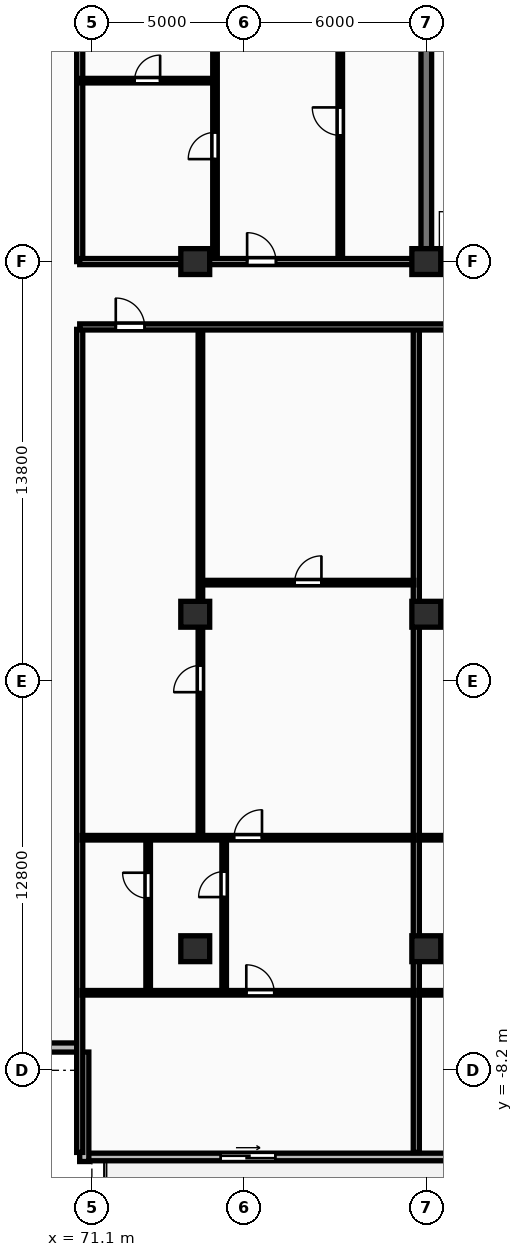
"""IFC4 building model, lengths in metres.
Left out: names, types, materials, properties, quantities, classifications, styles, units other than length and angle.
Written with IfcOpenShell. Run it as: python <this file> out.ifc"""

import sys

from ifc_helpers import new_model, si_unit, direction, frame, frame_2d, origin, origin_2d, place, context, subcontext, project, spatial, rectangle, extrude, element, fill, save


model = new_model("IFC4")
c1 = context("Model", 3, precision=1e-05, world=origin(), true_north=direction((0.0, 1.0)))
c2 = subcontext(c1, "Body", "Model", "MODEL_VIEW")
j1 = project(units=[si_unit("LENGTHUNIT", "METRE"), si_unit("PLANEANGLEUNIT", "RADIAN")], contexts=[c1])
p1 = place(None, origin())
s1 = spatial("IfcSite", under=j1, at=p1, CompositionType="ELEMENT")
p2 = place(p1, origin())
s2 = spatial("IfcBuilding", under=s1, at=p2, CompositionType="ELEMENT")
p3 = place(p2, frame((0.0, 0.0, 24.0)))
s3 = spatial("IfcBuildingStorey", under=s2, at=p3, CompositionType="ELEMENT", Elevation=24.0)
for number, where, z_axis, x_axis in (
    (1, (74.5, -4.2, 0.0), (0.0, 0.0, 1.0), (1.0, 0.0, 0.0)),
    (2, (74.5, 6.8, 0.0), (0.0, 0.0, 1.0), (1.0, 0.0, 0.0)),
    (3, (74.5, 18.4, 0.0), (0.0, 0.0, 1.0), (1.0, 0.0, 0.0)),
    (4, (82.1, -4.2, 0.0), (0.0, 0.0, 1.0), (1.0, 0.0, 0.0)),
    (5, (82.1, 6.8, 0.0), (0.0, 0.0, 1.0), (1.0, 0.0, 0.0)),
    (6, (82.1, 18.4, 0.0), (0.0, 0.0, 1.0), (1.0, 0.0, 0.0)),
):
    element("IfcColumn", number, at=place(p3, frame(where, z_axis=z_axis, x_axis=x_axis)), inside=s3, PredefinedType="COLUMN", context=c2, shape_type="SweptSolid", body=[
        extrude(rectangle(XDim=0.95, YDim=0.85, at=origin_2d()), origin(), (0.0, 0.0, 1.0), 3.25),
    ])
p4 = place(p3, frame((70.7, -11.05, 0.0), z_axis=(0.0, 0.0, 1.0), x_axis=(1.0, 0.0, 0.0)))
e7 = element("IfcWall", 7, at=p4, inside=s3, PredefinedType="STANDARD", context=c2, shape_type="SweptSolid", body=[
    extrude(rectangle(XDim=62.0, YDim=0.25, at=frame_2d((31.0, 0.0))), origin(), (0.0, 0.0, 1.0), 2.97),
])
p5 = place(p4, frame((4.636, 0.0, 0.0)))
e8 = element("IfcOpeningElement", 8, at=p5, cuts=e7, PredefinedType="OPENING", context=c2, shape_type="SweptSolid", body=[
    extrude(rectangle(XDim=1.8, YDim=2.2, at=frame_2d((0.9, 1.1))), frame((0.0, 0.135, 0.0), z_axis=(0.0, -1.0, 0.0), x_axis=(1.0, 0.0, 0.0)), (0.0, 0.0, 1.0), 0.27),
])
p6 = place(p4, frame((16.261, 0.0, 0.0)))
e9 = element("IfcOpeningElement", 9, at=p6, cuts=e7, PredefinedType="OPENING", context=c2, shape_type="SweptSolid", body=[
    extrude(rectangle(XDim=1.8, YDim=2.2, at=frame_2d((0.9, 1.1))), frame((0.0, 0.135, 0.0), z_axis=(0.0, -1.0, 0.0), x_axis=(1.0, 0.0, 0.0)), (0.0, 0.0, 1.0), 0.27),
])
p7 = place(p4, frame((27.886, 0.0, 0.0)))
e10 = element("IfcOpeningElement", 10, at=p7, cuts=e7, PredefinedType="OPENING", context=c2, shape_type="SweptSolid", body=[
    extrude(rectangle(XDim=1.8, YDim=2.2, at=frame_2d((0.9, 1.1))), frame((0.0, 0.135, 0.0), z_axis=(0.0, -1.0, 0.0), x_axis=(1.0, 0.0, 0.0)), (0.0, 0.0, 1.0), 0.27),
])
p8 = place(p4, frame((40.064, 0.0, 0.0)))
e11 = element("IfcOpeningElement", 11, at=p8, cuts=e7, PredefinedType="OPENING", context=c2, shape_type="SweptSolid", body=[
    extrude(rectangle(XDim=1.8, YDim=2.2, at=frame_2d((0.9, 1.1))), frame((0.0, 0.135, 0.0), z_axis=(0.0, -1.0, 0.0), x_axis=(1.0, 0.0, 0.0)), (0.0, 0.0, 1.0), 0.27),
])
p9 = place(p4, frame((51.124, 0.0, 0.0)))
e12 = element("IfcOpeningElement", 12, at=p9, cuts=e7, PredefinedType="OPENING", context=c2, shape_type="SweptSolid", body=[
    extrude(rectangle(XDim=1.8, YDim=2.2, at=frame_2d((0.9, 1.1))), frame((0.0, 0.135, 0.0), z_axis=(0.0, -1.0, 0.0), x_axis=(1.0, 0.0, 0.0)), (0.0, 0.0, 1.0), 0.27),
])
p10 = place(p4, frame((57.9, 0.0, 0.85)))
e13 = element("IfcOpeningElement", 13, at=p10, cuts=e7, PredefinedType="OPENING", context=c2, shape_type="SweptSolid", body=[
    extrude(rectangle(XDim=2.4, YDim=1.9, at=frame_2d((1.2, 0.95))), frame((0.0, 0.135, 0.0), z_axis=(0.0, -1.0, 0.0), x_axis=(1.0, 0.0, 0.0)), (0.0, 0.0, 1.0), 0.27),
])
for number, where, z_axis, x_axis in (
    (14, (67.1, -7.45, 0.0), (0.0, 0.0, 1.0), (1.0, 0.0, 0.0)),
    (15, (70.85, -7.6, 0.0), (0.0, 0.0, 1.0), (0.0, -1.0, 0.0)),
):
    element("IfcWall", number, at=place(p3, frame(where, z_axis=z_axis, x_axis=x_axis)), inside=s3, PredefinedType="STANDARD", context=c2, shape_type="SweptSolid", body=[
        extrude(rectangle(XDim=3.6, YDim=0.3, at=frame_2d((1.8, 0.0))), origin(), (0.0, 0.0, 1.0), 2.97),
    ])
p11 = place(p3, frame((82.1, 18.575, 0.0), z_axis=(0.0, 0.0, 1.0), x_axis=(0.0, 1.0, 0.0)))
e16 = element("IfcWall", 16, at=p11, inside=s3, PredefinedType="SHEAR", context=c2, shape_type="SweptSolid", body=[
    extrude(rectangle(XDim=11.65, YDim=0.35, at=frame_2d((5.825, 0.0))), origin(), (0.0, 0.0, 1.0), 3.25),
])
p12 = place(p3, frame((81.925, 18.4, 0.0), z_axis=(0.0, 0.0, 1.0), x_axis=(1.0, 0.0, 0.0)))
e17 = element("IfcWall", 17, at=p12, inside=s3, PredefinedType="SHEAR", context=c2, shape_type="SweptSolid", body=[
    extrude(rectangle(XDim=36.265, YDim=0.35, at=frame_2d((18.132, 0.0))), origin(), (0.0, 0.0, 1.0), 3.25),
])
p13 = place(p12, frame((5.675, 0.0, 0.0)))
e18 = element("IfcOpeningElement", 18, at=p13, cuts=e17, PredefinedType="OPENING", context=c2, shape_type="SweptSolid", body=[
    extrude(rectangle(XDim=1.0, YDim=2.15, at=frame_2d((0.5, 1.075))), frame((0.0, 0.185, 0.0), z_axis=(0.0, -1.0, 0.0), x_axis=(1.0, 0.0, 0.0)), (0.0, 0.0, 1.0), 0.37),
])
p14 = place(p12, frame((21.925, 0.0, 0.0)))
e19 = element("IfcOpeningElement", 19, at=p14, cuts=e17, PredefinedType="OPENING", context=c2, shape_type="SweptSolid", body=[
    extrude(rectangle(XDim=1.5, YDim=2.2, at=frame_2d((0.75, 1.1))), frame((0.0, 0.185, 0.0), z_axis=(0.0, -1.0, 0.0), x_axis=(1.0, 0.0, 0.0)), (0.0, 0.0, 1.0), 0.37),
])
p15 = place(p12, frame((29.875, 0.0, 0.0)))
e20 = element("IfcOpeningElement", 20, at=p15, cuts=e17, PredefinedType="OPENING", context=c2, shape_type="SweptSolid", body=[
    extrude(rectangle(XDim=1.0, YDim=2.15, at=frame_2d((0.5, 1.075))), frame((0.0, 0.185, 0.0), z_axis=(0.0, -1.0, 0.0), x_axis=(1.0, 0.0, 0.0)), (0.0, 0.0, 1.0), 0.37),
])
p16 = place(p3, frame((70.7, 18.4, 0.0), z_axis=(0.0, 0.0, 1.0), x_axis=(0.0, 1.0, 0.0)))
e21 = element("IfcWall", 21, at=p16, inside=s3, PredefinedType="PARTITIONING", context=c2, shape_type="SweptSolid", body=[
    extrude(rectangle(XDim=14.1, YDim=0.2, at=frame_2d((7.05, 0.0))), origin(), (0.0, 0.0, 1.0), 2.97),
])
p17 = place(p3, frame((70.7, 24.35, 0.0), z_axis=(0.0, 0.0, 1.0), x_axis=(1.0, 0.0, 0.0)))
e22 = element("IfcWall", 22, at=p17, inside=s3, PredefinedType="PARTITIONING", context=c2, shape_type="SweptSolid", body=[
    extrude(rectangle(XDim=4.45, YDim=0.15, at=frame_2d((2.225, 0.0))), origin(), (0.0, 0.0, 1.0), 2.97),
])
p18 = place(p17, frame((1.805, 0.0, 0.0)))
e23 = element("IfcOpeningElement", 23, at=p18, cuts=e22, PredefinedType="OPENING", context=c2, shape_type="SweptSolid", body=[
    extrude(rectangle(XDim=0.84, YDim=2.04, at=frame_2d((0.42, 1.02))), frame((0.0, 0.085, 0.0), z_axis=(0.0, -1.0, 0.0), x_axis=(1.0, 0.0, 0.0)), (0.0, 0.0, 1.0), 0.17),
])
p19 = place(p3, frame((75.15, 18.45, 0.0), z_axis=(0.0, 0.0, 1.0), x_axis=(0.0, 1.0, 0.0)))
e24 = element("IfcWall", 24, at=p19, inside=s3, PredefinedType="PARTITIONING", context=c2, shape_type="SweptSolid", body=[
    extrude(rectangle(XDim=14.05, YDim=0.15, at=frame_2d((7.025, 0.0))), origin(), (0.0, 0.0, 1.0), 2.97),
])
p20 = place(p19, frame((3.32, 0.0, 0.0)))
e25 = element("IfcOpeningElement", 25, at=p20, cuts=e24, PredefinedType="OPENING", context=c2, shape_type="SweptSolid", body=[
    extrude(rectangle(XDim=0.88, YDim=2.06, at=frame_2d((0.44, 1.03))), frame((0.0, 0.085, 0.0), z_axis=(0.0, -1.0, 0.0), x_axis=(1.0, 0.0, 0.0)), (0.0, 0.0, 1.0), 0.17),
])
p21 = place(p3, frame((79.27, 18.45, 0.0), z_axis=(0.0, 0.0, 1.0), x_axis=(0.0, 1.0, 0.0)))
e26 = element("IfcWall", 26, at=p21, inside=s3, PredefinedType="PARTITIONING", context=c2, shape_type="SweptSolid", body=[
    extrude(rectangle(XDim=9.12, YDim=0.15, at=frame_2d((4.56, 0.0))), origin(), (0.0, 0.0, 1.0), 2.97),
])
p22 = place(p21, frame((4.1, 0.0, 0.0)))
e27 = element("IfcOpeningElement", 27, at=p22, cuts=e26, PredefinedType="OPENING", context=c2, shape_type="SweptSolid", body=[
    extrude(rectangle(XDim=0.92, YDim=2.08, at=frame_2d((0.46, 1.04))), frame((0.0, 0.085, 0.0), z_axis=(0.0, -1.0, 0.0), x_axis=(1.0, 0.0, 0.0)), (0.0, 0.0, 1.0), 0.17),
])
p23 = place(p3, frame((70.7, 18.4, 0.0), z_axis=(0.0, 0.0, 1.0), x_axis=(1.0, 0.0, 0.0)))
e28 = element("IfcWall", 28, at=p23, inside=s3, PredefinedType="PARTITIONING", context=c2, shape_type="SweptSolid", body=[
    extrude(rectangle(XDim=11.25, YDim=0.2, at=frame_2d((5.625, 0.0))), origin(), (0.0, 0.0, 1.0), 2.37),
])
p24 = place(p23, frame((5.506, 0.0, 0.0)))
e29 = element("IfcOpeningElement", 29, at=p24, cuts=e28, PredefinedType="OPENING", context=c2, shape_type="SweptSolid", body=[
    extrude(rectangle(XDim=0.95, YDim=2.15, at=frame_2d((0.475, 1.075))), frame((0.0, 0.11, 0.0), z_axis=(0.0, -1.0, 0.0), x_axis=(1.0, 0.0, 0.0)), (0.0, 0.0, 1.0), 0.22),
])
p25 = place(p3, frame((70.7, -10.9, 0.0), z_axis=(0.0, 0.0, 1.0), x_axis=(0.0, 1.0, 0.0)))
e30 = element("IfcWall", 30, at=p25, inside=s3, PredefinedType="PARTITIONING", context=c2, shape_type="SweptSolid", body=[
    extrude(rectangle(XDim=27.07, YDim=0.2, at=frame_2d((13.535, 0.0))), origin(), (0.0, 0.0, 1.0), 2.97),
])
p26 = place(p3, frame((81.771, -10.9, 0.0), z_axis=(0.0, 0.0, 1.0), x_axis=(0.0, 1.0, 0.0)))
e31 = element("IfcWall", 31, at=p26, inside=s3, PredefinedType="PARTITIONING", context=c2, shape_type="SweptSolid", body=[
    extrude(rectangle(XDim=27.07, YDim=0.2, at=frame_2d((13.535, 0.0))), origin(), (0.0, 0.0, 1.0), 2.22),
])
p27 = place(p3, frame((74.73, 7.84, 0.0), z_axis=(0.0, 0.0, 1.0), x_axis=(1.0, 0.0, 0.0)))
e32 = element("IfcWall", 32, at=p27, inside=s3, PredefinedType="PARTITIONING", context=c2, shape_type="SweptSolid", body=[
    extrude(rectangle(XDim=6.961, YDim=0.15, at=frame_2d((3.481, 0.0))), origin(), (0.0, 0.0, 1.0), 2.97),
])
p28 = place(p27, frame((3.041, 0.0, 0.0)))
e33 = element("IfcOpeningElement", 33, at=p28, cuts=e32, PredefinedType="OPENING", context=c2, shape_type="SweptSolid", body=[
    extrude(rectangle(XDim=0.88, YDim=2.06, at=frame_2d((0.44, 1.03))), frame((0.0, 0.085, 0.0), z_axis=(0.0, -1.0, 0.0), x_axis=(1.0, 0.0, 0.0)), (0.0, 0.0, 1.0), 0.17),
])
p29 = place(p3, frame((74.67, -0.51, 0.0), z_axis=(0.0, 0.0, 1.0), x_axis=(0.0, 1.0, 0.0)))
e34 = element("IfcWall", 34, at=p29, inside=s3, PredefinedType="PARTITIONING", context=c2, shape_type="SweptSolid", body=[
    extrude(rectangle(XDim=16.7, YDim=0.15, at=frame_2d((8.35, 0.0))), origin(), (0.0, 0.0, 1.0), 2.22),
])
p30 = place(p29, frame((4.747, 0.0, 0.0)))
e35 = element("IfcOpeningElement", 35, at=p30, cuts=e34, PredefinedType="OPENING", context=c2, shape_type="SweptSolid", body=[
    extrude(rectangle(XDim=0.88, YDim=2.06, at=frame_2d((0.44, 1.03))), frame((0.0, 0.085, 0.0), z_axis=(0.0, -1.0, 0.0), x_axis=(1.0, 0.0, 0.0)), (0.0, 0.0, 1.0), 0.17),
])
p31 = place(p3, frame((72.951, -5.59, 0.0), z_axis=(0.0, 0.0, 1.0), x_axis=(0.0, 1.0, 0.0)))
e36 = element("IfcWall", 36, at=p31, inside=s3, PredefinedType="PARTITIONING", context=c2, shape_type="SweptSolid", body=[
    extrude(rectangle(XDim=5.0, YDim=0.15, at=frame_2d((2.5, 0.0))), origin(), (0.0, 0.0, 1.0), 2.97),
])
p32 = place(p31, frame((3.049, 0.0, 0.0)))
e37 = element("IfcOpeningElement", 37, at=p32, cuts=e36, PredefinedType="OPENING", context=c2, shape_type="SweptSolid", body=[
    extrude(rectangle(XDim=0.84, YDim=2.04, at=frame_2d((0.42, 1.02))), frame((0.0, 0.085, 0.0), z_axis=(0.0, -1.0, 0.0), x_axis=(1.0, 0.0, 0.0)), (0.0, 0.0, 1.0), 0.17),
])
p33 = place(p3, frame((75.451, -5.59, 0.0), z_axis=(0.0, 0.0, 1.0), x_axis=(0.0, 1.0, 0.0)))
e38 = element("IfcWall", 38, at=p33, inside=s3, PredefinedType="PARTITIONING", context=c2, shape_type="SweptSolid", body=[
    extrude(rectangle(XDim=5.0, YDim=0.15, at=frame_2d((2.5, 0.0))), origin(), (0.0, 0.0, 1.0), 2.97),
])
p34 = place(p33, frame((3.088, 0.0, 0.0)))
e39 = element("IfcOpeningElement", 39, at=p34, cuts=e38, PredefinedType="OPENING", context=c2, shape_type="SweptSolid", body=[
    extrude(rectangle(XDim=0.84, YDim=2.04, at=frame_2d((0.42, 1.02))), frame((0.0, 0.085, 0.0), z_axis=(0.0, -1.0, 0.0), x_axis=(1.0, 0.0, 0.0)), (0.0, 0.0, 1.0), 0.17),
])
p35 = place(p3, frame((70.78, -0.55, 0.0), z_axis=(0.0, 0.0, 1.0), x_axis=(1.0, 0.0, 0.0)))
e40 = element("IfcWall", 40, at=p35, inside=s3, PredefinedType="PARTITIONING", context=c2, shape_type="SweptSolid", body=[
    extrude(rectangle(XDim=10.911, YDim=0.15, at=frame_2d((5.456, 0.0))), origin(), (0.0, 0.0, 1.0), 2.97),
])
p36 = place(p35, frame((4.996, 0.0, 0.0)))
e41 = element("IfcOpeningElement", 41, at=p36, cuts=e40, PredefinedType="OPENING", context=c2, shape_type="SweptSolid", body=[
    extrude(rectangle(XDim=0.92, YDim=2.08, at=frame_2d((0.46, 1.04))), frame((0.0, 0.085, 0.0), z_axis=(0.0, -1.0, 0.0), x_axis=(1.0, 0.0, 0.0)), (0.0, 0.0, 1.0), 0.17),
])
p37 = place(p3, frame((70.78, -5.65, 0.0), z_axis=(0.0, 0.0, 1.0), x_axis=(1.0, 0.0, 0.0)))
e42 = element("IfcWall", 42, at=p37, inside=s3, PredefinedType="PARTITIONING", context=c2, shape_type="SweptSolid", body=[
    extrude(rectangle(XDim=10.911, YDim=0.15, at=frame_2d((5.456, 0.0))), origin(), (0.0, 0.0, 1.0), 2.97),
])
p38 = place(p37, frame((5.399, 0.0, 0.0)))
e43 = element("IfcOpeningElement", 43, at=p38, cuts=e42, PredefinedType="OPENING", context=c2, shape_type="SweptSolid", body=[
    extrude(rectangle(XDim=0.92, YDim=2.08, at=frame_2d((0.46, 1.04))), frame((0.0, 0.085, 0.0), z_axis=(0.0, -1.0, 0.0), x_axis=(1.0, 0.0, 0.0)), (0.0, 0.0, 1.0), 0.17),
])
p39 = place(p3, frame((81.851, -0.55, 0.0), z_axis=(0.0, 0.0, 1.0), x_axis=(1.0, 0.0, 0.0)))
e44 = element("IfcWall", 44, at=p39, inside=s3, PredefinedType="PARTITIONING", context=c2, shape_type="SweptSolid", body=[
    extrude(rectangle(XDim=12.019, YDim=0.15, at=frame_2d((6.009, 0.0))), origin(), (0.0, 0.0, 1.0), 2.97),
])
p40 = place(p39, frame((5.999, 0.0, 0.0)))
e45 = element("IfcOpeningElement", 45, at=p40, cuts=e44, PredefinedType="OPENING", context=c2, shape_type="SweptSolid", body=[
    extrude(rectangle(XDim=0.92, YDim=2.08, at=frame_2d((0.46, 1.04))), frame((0.0, 0.085, 0.0), z_axis=(0.0, -1.0, 0.0), x_axis=(1.0, 0.0, 0.0)), (0.0, 0.0, 1.0), 0.17),
])
p41 = place(p3, frame((81.851, -5.65, 0.0), z_axis=(0.0, 0.0, 1.0), x_axis=(1.0, 0.0, 0.0)))
e46 = element("IfcWall", 46, at=p41, inside=s3, PredefinedType="PARTITIONING", context=c2, shape_type="SweptSolid", body=[
    extrude(rectangle(XDim=12.019, YDim=0.15, at=frame_2d((6.009, 0.0))), origin(), (0.0, 0.0, 1.0), 2.97),
])
p42 = place(p41, frame((6.029, 0.0, 0.0)))
e47 = element("IfcOpeningElement", 47, at=p42, cuts=e46, PredefinedType="OPENING", context=c2, shape_type="SweptSolid", body=[
    extrude(rectangle(XDim=0.92, YDim=2.08, at=frame_2d((0.46, 1.04))), frame((0.0, 0.085, 0.0), z_axis=(0.0, -1.0, 0.0), x_axis=(1.0, 0.0, 0.0)), (0.0, 0.0, 1.0), 0.17),
])
p43 = place(p3, frame((70.7, 16.25, 0.0), z_axis=(0.0, 0.0, 1.0), x_axis=(1.0, 0.0, 0.0)))
e48 = element("IfcWall", 48, at=p43, inside=s3, PredefinedType="PARTITIONING", context=c2, shape_type="SweptSolid", body=[
    extrude(rectangle(XDim=62.0, YDim=0.2, at=frame_2d((31.0, 0.0))), origin(), (0.0, 0.0, 1.0), 2.97),
])
p44 = place(p43, frame((1.186, 0.0, 0.0)))
e49 = element("IfcOpeningElement", 49, at=p44, cuts=e48, PredefinedType="OPENING", context=c2, shape_type="SweptSolid", body=[
    extrude(rectangle(XDim=0.95, YDim=2.15, at=frame_2d((0.475, 1.075))), frame((0.0, 0.11, 0.0), z_axis=(0.0, -1.0, 0.0), x_axis=(1.0, 0.0, 0.0)), (0.0, 0.0, 1.0), 0.22),
])
p45 = place(p43, frame((13.116, 0.0, 0.0)))
e50 = element("IfcOpeningElement", 50, at=p45, cuts=e48, PredefinedType="OPENING", context=c2, shape_type="SweptSolid", body=[
    extrude(rectangle(XDim=0.95, YDim=2.15, at=frame_2d((0.475, 1.075))), frame((0.0, 0.11, 0.0), z_axis=(0.0, -1.0, 0.0), x_axis=(1.0, 0.0, 0.0)), (0.0, 0.0, 1.0), 0.22),
])
p46 = place(p43, frame((25.295, 0.0, 0.0)))
e51 = element("IfcOpeningElement", 51, at=p46, cuts=e48, PredefinedType="OPENING", context=c2, shape_type="SweptSolid", body=[
    extrude(rectangle(XDim=0.95, YDim=2.15, at=frame_2d((0.475, 1.075))), frame((0.0, 0.11, 0.0), z_axis=(0.0, -1.0, 0.0), x_axis=(1.0, 0.0, 0.0)), (0.0, 0.0, 1.0), 0.22),
])
p47 = place(p43, frame((35.747, 0.0, 0.0)))
e52 = element("IfcOpeningElement", 52, at=p47, cuts=e48, PredefinedType="OPENING", context=c2, shape_type="SweptSolid", body=[
    extrude(rectangle(XDim=0.95, YDim=2.15, at=frame_2d((0.475, 1.075))), frame((0.0, 0.11, 0.0), z_axis=(0.0, -1.0, 0.0), x_axis=(1.0, 0.0, 0.0)), (0.0, 0.0, 1.0), 0.22),
])
p48 = place(p43, frame((49.652, 0.0, 0.0)))
e53 = element("IfcOpeningElement", 53, at=p48, cuts=e48, PredefinedType="OPENING", context=c2, shape_type="SweptSolid", body=[
    extrude(rectangle(XDim=0.95, YDim=2.15, at=frame_2d((0.475, 1.075))), frame((0.0, 0.11, 0.0), z_axis=(0.0, -1.0, 0.0), x_axis=(1.0, 0.0, 0.0)), (0.0, 0.0, 1.0), 0.22),
])
p49 = place(p5, origin())
e54 = element("IfcDoor", 54, at=p49, inside=s3, OperationType="SLIDING_TO_RIGHT", PredefinedType="DOOR", context=c2, shape_type="SweptSolid", body=[
    extrude(rectangle(XDim=1.8, YDim=2.2, at=frame_2d((0.9, 1.1))), frame((0.0, 0.025, 0.0), z_axis=(0.0, -1.0, 0.0), x_axis=(1.0, 0.0, 0.0)), (0.0, 0.0, 1.0), 0.05),
])
fill(e8, e54)
p50 = place(p18, origin())
e55 = element("IfcDoor", 55, at=p50, inside=s3, OperationType="SINGLE_SWING_RIGHT", PredefinedType="DOOR", context=c2, shape_type="SweptSolid", body=[
    extrude(rectangle(XDim=0.84, YDim=2.04, at=frame_2d((0.42, 1.02))), frame((0.0, 0.025, 0.0), z_axis=(0.0, -1.0, 0.0), x_axis=(1.0, 0.0, 0.0)), (0.0, 0.0, 1.0), 0.05),
])
fill(e23, e55)
p51 = place(p20, origin())
e56 = element("IfcDoor", 56, at=p51, inside=s3, OperationType="SINGLE_SWING_LEFT", PredefinedType="DOOR", context=c2, shape_type="SweptSolid", body=[
    extrude(rectangle(XDim=0.88, YDim=2.06, at=frame_2d((0.44, 1.03))), frame((0.0, 0.025, 0.0), z_axis=(0.0, -1.0, 0.0), x_axis=(1.0, 0.0, 0.0)), (0.0, 0.0, 1.0), 0.05),
])
fill(e25, e56)
p52 = place(p22, origin())
e57 = element("IfcDoor", 57, at=p52, inside=s3, OperationType="SINGLE_SWING_RIGHT", PredefinedType="DOOR", context=c2, shape_type="SweptSolid", body=[
    extrude(rectangle(XDim=0.92, YDim=2.08, at=frame_2d((0.46, 1.04))), frame((0.0, 0.025, 0.0), z_axis=(0.0, -1.0, 0.0), x_axis=(1.0, 0.0, 0.0)), (0.0, 0.0, 1.0), 0.05),
])
fill(e27, e57)
p53 = place(p24, origin())
e58 = element("IfcDoor", 58, at=p53, inside=s3, OperationType="SINGLE_SWING_LEFT", PredefinedType="DOOR", context=c2, shape_type="SweptSolid", body=[
    extrude(rectangle(XDim=0.95, YDim=2.15, at=frame_2d((0.475, 1.075))), frame((0.0, 0.025, 0.0), z_axis=(0.0, -1.0, 0.0), x_axis=(1.0, 0.0, 0.0)), (0.0, 0.0, 1.0), 0.05),
])
fill(e29, e58)
p54 = place(p28, origin())
e59 = element("IfcDoor", 59, at=p54, inside=s3, OperationType="SINGLE_SWING_RIGHT", PredefinedType="DOOR", context=c2, shape_type="SweptSolid", body=[
    extrude(rectangle(XDim=0.88, YDim=2.06, at=frame_2d((0.44, 1.03))), frame((0.0, 0.025, 0.0), z_axis=(0.0, -1.0, 0.0), x_axis=(1.0, 0.0, 0.0)), (0.0, 0.0, 1.0), 0.05),
])
fill(e33, e59)
p55 = place(p30, origin())
e60 = element("IfcDoor", 60, at=p55, inside=s3, OperationType="SINGLE_SWING_LEFT", PredefinedType="DOOR", context=c2, shape_type="SweptSolid", body=[
    extrude(rectangle(XDim=0.88, YDim=2.06, at=frame_2d((0.44, 1.03))), frame((0.0, 0.025, 0.0), z_axis=(0.0, -1.0, 0.0), x_axis=(1.0, 0.0, 0.0)), (0.0, 0.0, 1.0), 0.05),
])
fill(e35, e60)
p56 = place(p32, origin())
e61 = element("IfcDoor", 61, at=p56, inside=s3, OperationType="SINGLE_SWING_RIGHT", PredefinedType="DOOR", context=c2, shape_type="SweptSolid", body=[
    extrude(rectangle(XDim=0.84, YDim=2.04, at=frame_2d((0.42, 1.02))), frame((0.0, 0.025, 0.0), z_axis=(0.0, -1.0, 0.0), x_axis=(1.0, 0.0, 0.0)), (0.0, 0.0, 1.0), 0.05),
])
fill(e37, e61)
p57 = place(p34, origin())
e62 = element("IfcDoor", 62, at=p57, inside=s3, OperationType="SINGLE_SWING_LEFT", PredefinedType="DOOR", context=c2, shape_type="SweptSolid", body=[
    extrude(rectangle(XDim=0.84, YDim=2.04, at=frame_2d((0.42, 1.02))), frame((0.0, 0.025, 0.0), z_axis=(0.0, -1.0, 0.0), x_axis=(1.0, 0.0, 0.0)), (0.0, 0.0, 1.0), 0.05),
])
fill(e39, e62)
p58 = place(p36, origin())
e63 = element("IfcDoor", 63, at=p58, inside=s3, OperationType="SINGLE_SWING_RIGHT", PredefinedType="DOOR", context=c2, shape_type="SweptSolid", body=[
    extrude(rectangle(XDim=0.92, YDim=2.08, at=frame_2d((0.46, 1.04))), frame((0.0, 0.025, 0.0), z_axis=(0.0, -1.0, 0.0), x_axis=(1.0, 0.0, 0.0)), (0.0, 0.0, 1.0), 0.05),
])
fill(e41, e63)
p59 = place(p38, origin())
e64 = element("IfcDoor", 64, at=p59, inside=s3, OperationType="SINGLE_SWING_LEFT", PredefinedType="DOOR", context=c2, shape_type="SweptSolid", body=[
    extrude(rectangle(XDim=0.92, YDim=2.08, at=frame_2d((0.46, 1.04))), frame((0.0, 0.025, 0.0), z_axis=(0.0, -1.0, 0.0), x_axis=(1.0, 0.0, 0.0)), (0.0, 0.0, 1.0), 0.05),
])
fill(e43, e64)
p60 = place(p44, origin())
e65 = element("IfcDoor", 65, at=p60, inside=s3, OperationType="SINGLE_SWING_LEFT", PredefinedType="DOOR", context=c2, shape_type="SweptSolid", body=[
    extrude(rectangle(XDim=0.95, YDim=2.15, at=frame_2d((0.475, 1.075))), frame((0.0, 0.025, 0.0), z_axis=(0.0, -1.0, 0.0), x_axis=(1.0, 0.0, 0.0)), (0.0, 0.0, 1.0), 0.05),
])
fill(e49, e65)
save(model, sys.argv[1])
